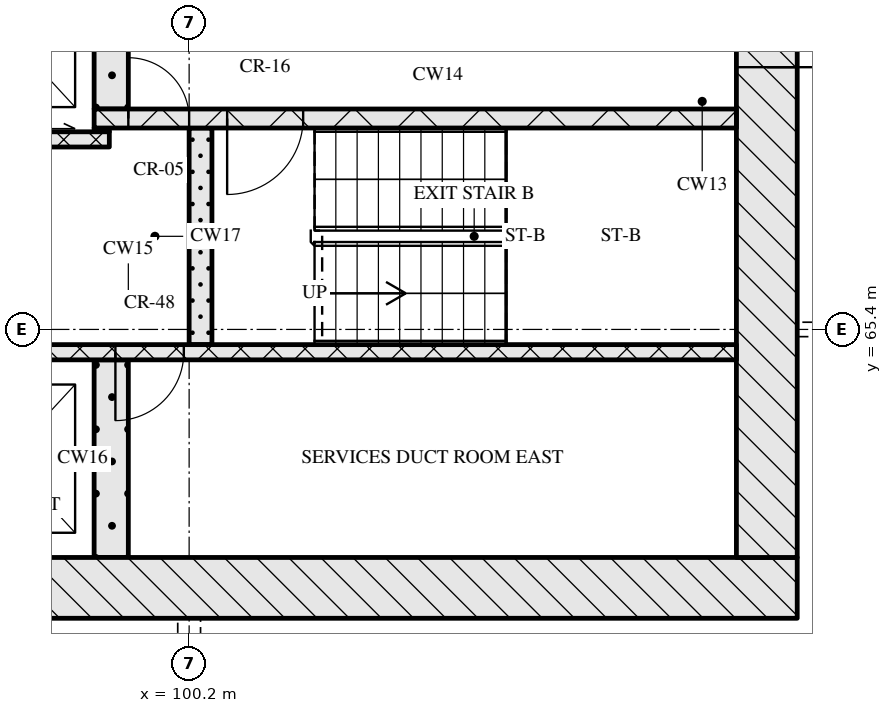
"""IFC4 building model, lengths in metres.
Left out: names, types, materials, properties, quantities, classifications, styles, units other than length and angle.
Written with IfcOpenShell. Run it as: python <this file> out.ifc"""

import sys

from ifc_helpers import new_model, si_unit, direction, frame, frame_2d, origin, place, context, subcontext, project, spatial, rectangle, extrude, element, fill, save


model = new_model("IFC4")
c1 = context("Model", 3, precision=1e-05, world=origin(), true_north=direction((0.0, 1.0)))
c2 = subcontext(c1, "Body", "Model", "MODEL_VIEW")
j1 = project(units=[si_unit("LENGTHUNIT", "METRE"), si_unit("PLANEANGLEUNIT", "RADIAN")], contexts=[c1])
p1 = place(None, origin())
s1 = spatial("IfcSite", under=j1, at=p1, CompositionType="ELEMENT")
p2 = place(p1, origin())
s2 = spatial("IfcBuilding", under=s1, at=p2, CompositionType="ELEMENT")
p3 = place(p2, frame((0.0, 0.0, 169.05)))
s3 = spatial("IfcBuildingStorey", under=s2, at=p3, CompositionType="ELEMENT", Elevation=169.05)
p4 = place(p3, frame((67.0, 62.0, 0.0), z_axis=(0.0, 0.0, 1.0), x_axis=(1.0, 0.0, 0.0)))
e1 = element("IfcWall", 1, at=p4, inside=s3, PredefinedType="SOLIDWALL", context=c2, shape_type="SweptSolid", body=[
    extrude(rectangle(XDim=41.2, YDim=0.8, at=frame_2d((20.6, 0.0))), origin(), (0.0, 0.0, 1.0), 3.32),
])
p5 = place(p4, frame((20.95, 0.0, 0.0)))
e2 = element("IfcOpeningElement", 2, at=p5, cuts=e1, PredefinedType="OPENING", context=c2, shape_type="SweptSolid", body=[
    extrude(rectangle(XDim=1.8, YDim=2.1, at=frame_2d((0.9, 1.05))), frame((0.0, 0.41, 0.0), z_axis=(0.0, -1.0, 0.0), x_axis=(1.0, 0.0, 0.0)), (0.0, 0.0, 1.0), 0.82),
])
p6 = place(p3, frame((107.8, 62.4, 0.0), z_axis=(0.0, 0.0, 1.0), x_axis=(0.0, 1.0, 0.0)))
e3 = element("IfcWall", 3, at=p6, inside=s3, PredefinedType="SOLIDWALL", context=c2, shape_type="SweptSolid", body=[
    extrude(rectangle(XDim=12.0, YDim=0.8, at=frame_2d((6.0, 0.0))), origin(), (0.0, 0.0, 1.0), 3.32),
])
p7 = place(p6, frame((6.45, 0.0, 0.0)))
e4 = element("IfcOpeningElement", 4, at=p7, cuts=e3, PredefinedType="OPENING", context=c2, shape_type="SweptSolid", body=[
    extrude(rectangle(XDim=1.2, YDim=2.1, at=frame_2d((0.6, 1.05))), frame((0.0, 0.41, 0.0), z_axis=(0.0, -1.0, 0.0), x_axis=(1.0, 0.0, 0.0)), (0.0, 0.0, 1.0), 0.82),
])
p8 = place(p3, frame((99.175, 62.4, 0.0), z_axis=(0.0, 0.0, 1.0), x_axis=(0.0, 1.0, 0.0)))
e5 = element("IfcWall", 5, at=p8, inside=s3, PredefinedType="SOLIDWALL", context=c2, shape_type="SweptSolid", body=[
    extrude(rectangle(XDim=2.6, YDim=0.45, at=frame_2d((1.3, 0.0))), origin(), (0.0, 0.0, 1.0), 3.32),
])
p9 = place(p3, frame((91.4, 65.1, 0.0), z_axis=(0.0, 0.0, 1.0), x_axis=(1.0, 0.0, 0.0)))
e6 = element("IfcWall", 6, at=p9, inside=s3, PredefinedType="SOLIDWALL", context=c2, shape_type="SweptSolid", body=[
    extrude(rectangle(XDim=16.0, YDim=0.2, at=frame_2d((8.0, 0.0))), origin(), (0.0, 0.0, 1.0), 3.32),
])
p10 = place(p9, frame((0.85, 0.0, 0.0)))
e7 = element("IfcOpeningElement", 7, at=p10, cuts=e6, PredefinedType="OPENING", context=c2, shape_type="SweptSolid", body=[
    extrude(rectangle(XDim=1.1, YDim=2.1, at=frame_2d((0.55, 1.05))), frame((0.0, 0.11, 0.0), z_axis=(0.0, -1.0, 0.0), x_axis=(1.0, 0.0, 0.0)), (0.0, 0.0, 1.0), 0.22),
])
p11 = place(p9, frame((3.35, 0.0, 0.0)))
e8 = element("IfcOpeningElement", 8, at=p11, cuts=e6, PredefinedType="OPENING", context=c2, shape_type="SweptSolid", body=[
    extrude(rectangle(XDim=1.1, YDim=2.1, at=frame_2d((0.55, 1.05))), frame((0.0, 0.11, 0.0), z_axis=(0.0, -1.0, 0.0), x_axis=(1.0, 0.0, 0.0)), (0.0, 0.0, 1.0), 0.22),
])
p12 = place(p9, frame((5.85, 0.0, 0.0)))
e9 = element("IfcOpeningElement", 9, at=p12, cuts=e6, PredefinedType="OPENING", context=c2, shape_type="SweptSolid", body=[
    extrude(rectangle(XDim=1.1, YDim=2.1, at=frame_2d((0.55, 1.05))), frame((0.0, 0.11, 0.0), z_axis=(0.0, -1.0, 0.0), x_axis=(1.0, 0.0, 0.0)), (0.0, 0.0, 1.0), 0.22),
])
p13 = place(p9, frame((7.83, 0.0, 0.0)))
e10 = element("IfcOpeningElement", 10, at=p13, cuts=e6, PredefinedType="OPENING", context=c2, shape_type="SweptSolid", body=[
    extrude(rectangle(XDim=0.9, YDim=2.1, at=frame_2d((0.45, 1.05))), frame((0.0, 0.11, 0.0), z_axis=(0.0, -1.0, 0.0), x_axis=(1.0, 0.0, 0.0)), (0.0, 0.0, 1.0), 0.22),
])
p14 = place(p3, frame((100.35, 65.2, 0.0), z_axis=(0.0, 0.0, 1.0), x_axis=(0.0, 1.0, 0.0)))
e11 = element("IfcWall", 11, at=p14, inside=s3, PredefinedType="SOLIDWALL", context=c2, shape_type="SweptSolid", body=[
    extrude(rectangle(XDim=2.85, YDim=0.3, at=frame_2d((1.425, 0.0))), origin(), (0.0, 0.0, 1.0), 3.32),
])
p15 = place(p3, frame((76.05, 67.9, 0.0), z_axis=(0.0, 0.0, 1.0), x_axis=(1.0, 0.0, 0.0)))
e12 = element("IfcWall", 12, at=p15, inside=s3, PredefinedType="SOLIDWALL", context=c2, shape_type="SweptSolid", body=[
    extrude(rectangle(XDim=23.1, YDim=0.2, at=frame_2d((11.55, 0.0))), origin(), (0.0, 0.0, 1.0), 3.32),
])
p16 = place(p15, frame((1.35, 0.0, 0.0)))
e13 = element("IfcOpeningElement", 13, at=p16, cuts=e12, PredefinedType="OPENING", context=c2, shape_type="SweptSolid", body=[
    extrude(rectangle(XDim=0.9, YDim=2.1, at=frame_2d((0.45, 1.05))), frame((0.0, 0.11, 0.0), z_axis=(0.0, -1.0, 0.0), x_axis=(1.0, 0.0, 0.0)), (0.0, 0.0, 1.0), 0.22),
])
p17 = place(p15, frame((5.06, 0.0, 0.0)))
e14 = element("IfcOpeningElement", 14, at=p17, cuts=e12, PredefinedType="OPENING", context=c2, shape_type="SweptSolid", body=[
    extrude(rectangle(XDim=0.9, YDim=2.1, at=frame_2d((0.45, 1.05))), frame((0.0, 0.11, 0.0), z_axis=(0.0, -1.0, 0.0), x_axis=(1.0, 0.0, 0.0)), (0.0, 0.0, 1.0), 0.22),
])
p18 = place(p15, frame((8.45, 0.0, 0.0)))
e15 = element("IfcOpeningElement", 15, at=p18, cuts=e12, PredefinedType="OPENING", context=c2, shape_type="SweptSolid", body=[
    extrude(rectangle(XDim=0.9, YDim=2.1, at=frame_2d((0.45, 1.05))), frame((0.0, 0.11, 0.0), z_axis=(0.0, -1.0, 0.0), x_axis=(1.0, 0.0, 0.0)), (0.0, 0.0, 1.0), 0.22),
])
p19 = place(p15, frame((10.91, 0.0, 0.0)))
e16 = element("IfcOpeningElement", 16, at=p19, cuts=e12, PredefinedType="OPENING", context=c2, shape_type="SweptSolid", body=[
    extrude(rectangle(XDim=0.9, YDim=2.1, at=frame_2d((0.45, 1.05))), frame((0.0, 0.11, 0.0), z_axis=(0.0, -1.0, 0.0), x_axis=(1.0, 0.0, 0.0)), (0.0, 0.0, 1.0), 0.22),
])
p20 = place(p15, frame((13.55, 0.0, 0.0)))
e17 = element("IfcOpeningElement", 17, at=p20, cuts=e12, PredefinedType="OPENING", context=c2, shape_type="SweptSolid", body=[
    extrude(rectangle(XDim=1.0, YDim=2.1, at=frame_2d((0.5, 1.05))), frame((0.0, 0.11, 0.0), z_axis=(0.0, -1.0, 0.0), x_axis=(1.0, 0.0, 0.0)), (0.0, 0.0, 1.0), 0.22),
])
p21 = place(p15, frame((16.2, 0.0, 0.0)))
e18 = element("IfcOpeningElement", 18, at=p21, cuts=e12, PredefinedType="OPENING", context=c2, shape_type="SweptSolid", body=[
    extrude(rectangle(XDim=1.1, YDim=2.1, at=frame_2d((0.55, 1.05))), frame((0.0, 0.11, 0.0), z_axis=(0.0, -1.0, 0.0), x_axis=(1.0, 0.0, 0.0)), (0.0, 0.0, 1.0), 0.22),
])
p22 = place(p15, frame((18.7, 0.0, 0.0)))
e19 = element("IfcOpeningElement", 19, at=p22, cuts=e12, PredefinedType="OPENING", context=c2, shape_type="SweptSolid", body=[
    extrude(rectangle(XDim=1.1, YDim=2.1, at=frame_2d((0.55, 1.05))), frame((0.0, 0.11, 0.0), z_axis=(0.0, -1.0, 0.0), x_axis=(1.0, 0.0, 0.0)), (0.0, 0.0, 1.0), 0.22),
])
p23 = place(p15, frame((21.2, 0.0, 0.0)))
e20 = element("IfcOpeningElement", 20, at=p23, cuts=e12, PredefinedType="OPENING", context=c2, shape_type="SweptSolid", body=[
    extrude(rectangle(XDim=1.1, YDim=2.1, at=frame_2d((0.55, 1.05))), frame((0.0, 0.11, 0.0), z_axis=(0.0, -1.0, 0.0), x_axis=(1.0, 0.0, 0.0)), (0.0, 0.0, 1.0), 0.22),
])
p24 = place(p3, frame((98.95, 68.025, 0.0), z_axis=(0.0, 0.0, 1.0), x_axis=(1.0, 0.0, 0.0)))
e21 = element("IfcWall", 21, at=p24, inside=s3, PredefinedType="SOLIDWALL", context=c2, shape_type="SweptSolid", body=[
    extrude(rectangle(XDim=0.2, YDim=0.05, at=frame_2d((0.1, 0.0))), origin(), (0.0, 0.0, 1.0), 3.32),
])
p25 = place(p3, frame((98.95, 68.175, 0.0), z_axis=(0.0, 0.0, 1.0), x_axis=(1.0, 0.0, 0.0)))
e22 = element("IfcWall", 22, at=p25, inside=s3, PredefinedType="SOLIDWALL", context=c2, shape_type="SweptSolid", body=[
    extrude(rectangle(XDim=8.45, YDim=0.25, at=frame_2d((4.225, 0.0))), origin(), (0.0, 0.0, 1.0), 3.32),
])
p26 = place(p25, frame((0.45, 0.0, 0.0)))
e23 = element("IfcOpeningElement", 23, at=p26, cuts=e22, PredefinedType="OPENING", context=c2, shape_type="SweptSolid", body=[
    extrude(rectangle(XDim=0.8, YDim=2.1, at=frame_2d((0.4, 1.05))), frame((0.0, 0.135, 0.0), z_axis=(0.0, -1.0, 0.0), x_axis=(1.0, 0.0, 0.0)), (0.0, 0.0, 1.0), 0.27),
])
p27 = place(p25, frame((1.75, 0.0, 0.0)))
e24 = element("IfcOpeningElement", 24, at=p27, cuts=e22, PredefinedType="OPENING", context=c2, shape_type="SweptSolid", body=[
    extrude(rectangle(XDim=1.0, YDim=2.1, at=frame_2d((0.5, 1.05))), frame((0.0, 0.135, 0.0), z_axis=(0.0, -1.0, 0.0), x_axis=(1.0, 0.0, 0.0)), (0.0, 0.0, 1.0), 0.27),
])
p28 = place(p3, frame((99.175, 68.3, 0.0), z_axis=(0.0, 0.0, 1.0), x_axis=(0.0, 1.0, 0.0)))
e25 = element("IfcWall", 25, at=p28, inside=s3, PredefinedType="SOLIDWALL", context=c2, shape_type="SweptSolid", body=[
    extrude(rectangle(XDim=2.3, YDim=0.45, at=frame_2d((1.15, 0.0))), origin(), (0.0, 0.0, 1.0), 3.32),
])
p29 = place(p13, origin())
e26 = element("IfcDoor", 26, at=p29, inside=s3, OperationType="SINGLE_SWING_RIGHT", PredefinedType="DOOR", context=c2, shape_type="SweptSolid", body=[
    extrude(rectangle(XDim=0.9, YDim=2.1, at=frame_2d((0.45, 1.05))), frame((0.0, 0.025, 0.0), z_axis=(0.0, -1.0, 0.0), x_axis=(1.0, 0.0, 0.0)), (0.0, 0.0, 1.0), 0.05),
])
fill(e10, e26)
p30 = place(p26, origin())
e27 = element("IfcDoor", 27, at=p30, inside=s3, OperationType="SINGLE_SWING_LEFT", PredefinedType="DOOR", context=c2, shape_type="SweptSolid", body=[
    extrude(rectangle(XDim=0.8, YDim=2.1, at=frame_2d((0.4, 1.05))), frame((0.0, 0.025, 0.0), z_axis=(0.0, -1.0, 0.0), x_axis=(1.0, 0.0, 0.0)), (0.0, 0.0, 1.0), 0.05),
])
fill(e23, e27)
p31 = place(p27, origin())
e28 = element("IfcDoor", 28, at=p31, inside=s3, OperationType="SINGLE_SWING_RIGHT", PredefinedType="DOOR", context=c2, shape_type="SweptSolid", body=[
    extrude(rectangle(XDim=1.0, YDim=2.1, at=frame_2d((0.5, 1.05))), frame((0.0, 0.025, 0.0), z_axis=(0.0, -1.0, 0.0), x_axis=(1.0, 0.0, 0.0)), (0.0, 0.0, 1.0), 0.05),
])
fill(e24, e28)
p32 = place(p7, origin())
e29 = element("IfcDoor", 29, at=p32, inside=s3, OperationType="SINGLE_SWING_RIGHT", PredefinedType="DOOR", context=c2, shape_type="SweptSolid", body=[
    extrude(rectangle(XDim=1.2, YDim=2.1, at=frame_2d((0.6, 1.05))), frame((0.0, 0.025, 0.0), z_axis=(0.0, -1.0, 0.0), x_axis=(1.0, 0.0, 0.0)), (0.0, 0.0, 1.0), 0.05),
])
fill(e4, e29)
save(model, sys.argv[1])
